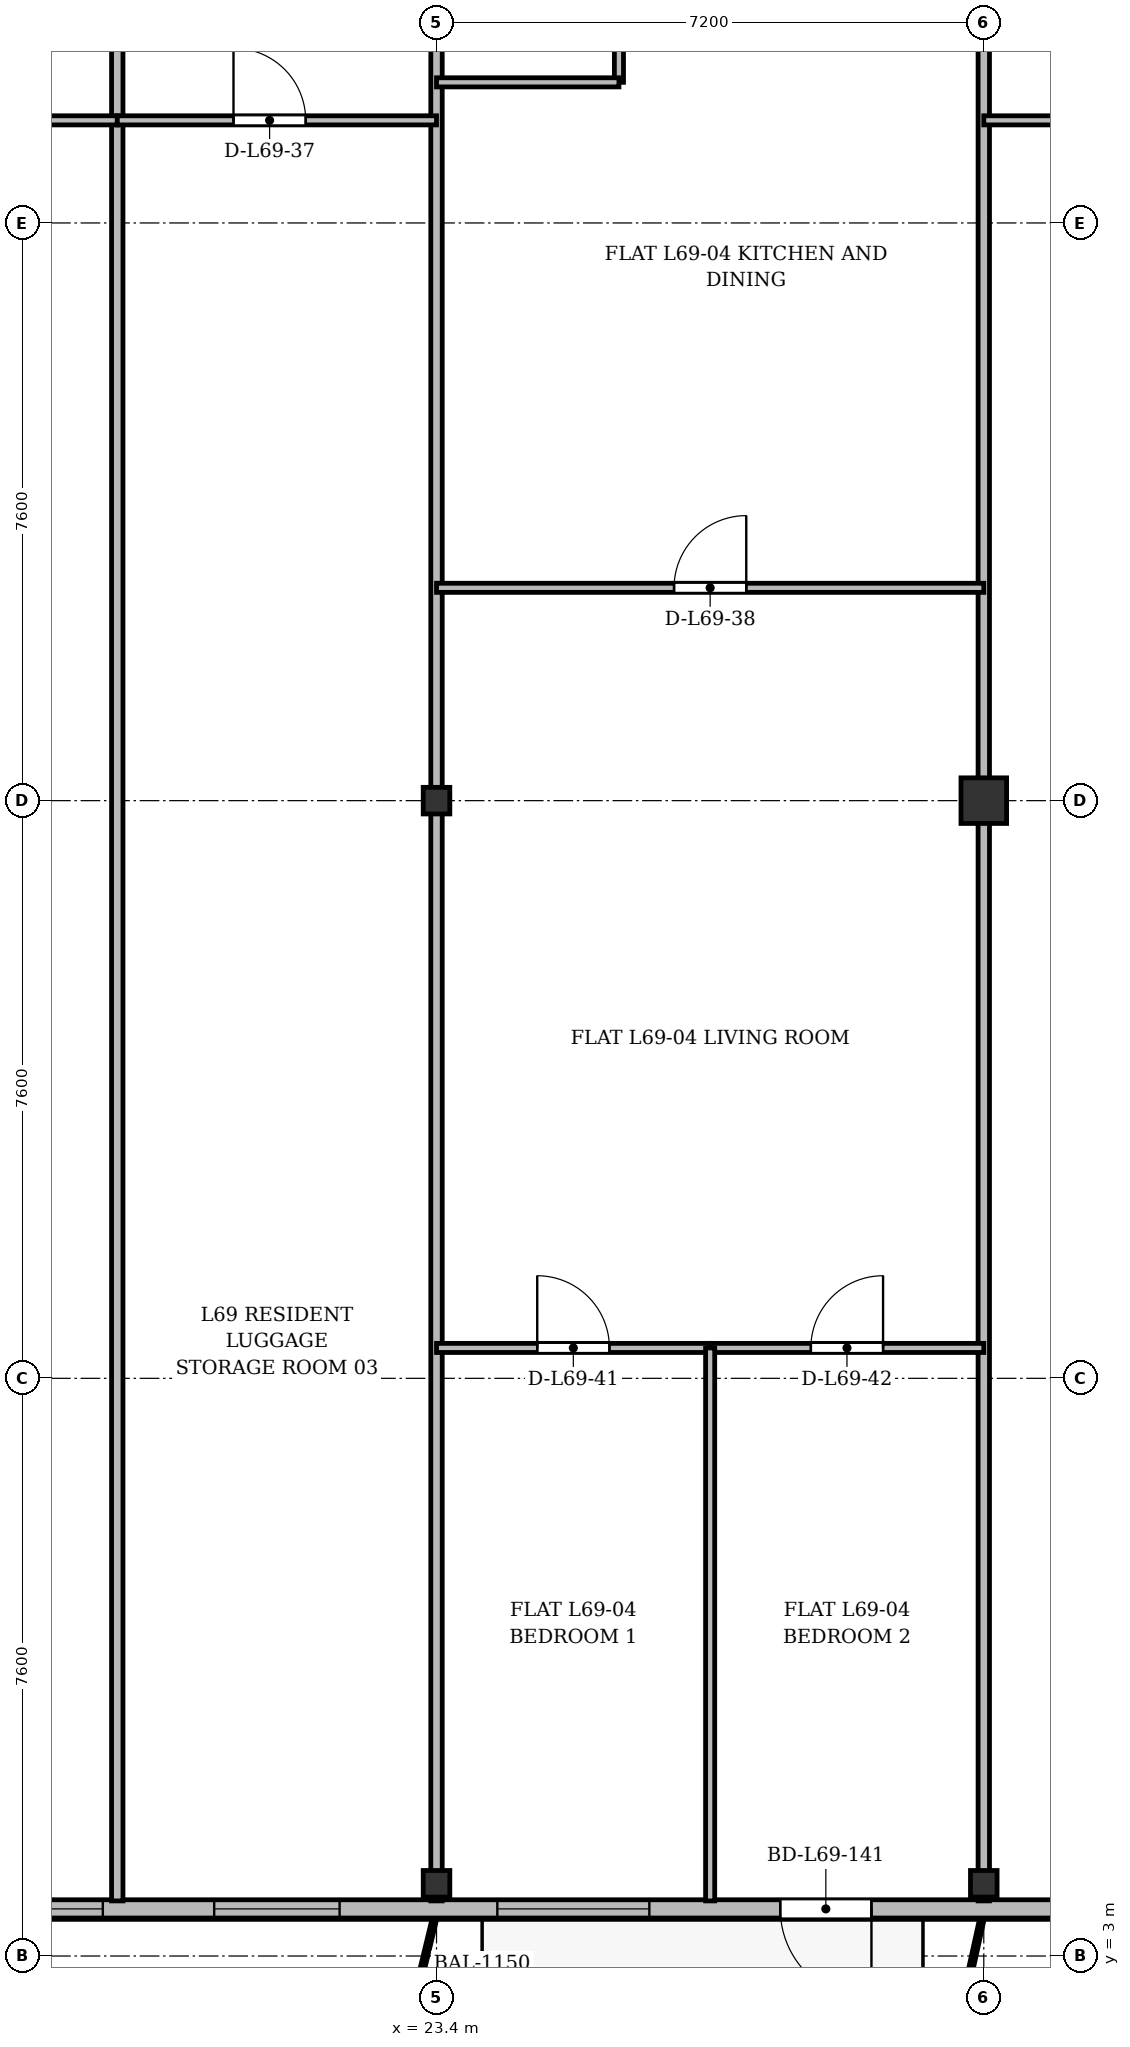
"""IFC4 building model, lengths in metres.
Left out: names, types, materials, properties, quantities, classifications, styles, units other than length and angle.
Written with IfcOpenShell. Run it as: python <this file> out.ifc"""

import sys

from ifc_helpers import new_model, si_unit, direction, frame, frame_2d, origin, origin_2d, place, context, subcontext, project, spatial, rectangle, i_section, extrude, source, transform, mapped, element, fill, save


model = new_model("IFC4")
c1 = context("Model", 3, precision=1e-05, world=origin(), true_north=direction((0.0, 1.0)))
c2 = subcontext(c1, "Body", "Model", "MODEL_VIEW")
j1 = project(units=[si_unit("LENGTHUNIT", "METRE"), si_unit("PLANEANGLEUNIT", "RADIAN")], contexts=[c1])
p1 = place(None, origin())
s1 = spatial("IfcSite", under=j1, at=p1, CompositionType="ELEMENT")
p2 = place(p1, origin())
s2 = spatial("IfcBuilding", under=s1, at=p2, CompositionType="ELEMENT")
p3 = place(p2, frame((0.0, 0.0, 266.7)))
s3 = spatial("IfcBuildingStorey", under=s2, at=p3, CompositionType="ELEMENT", Elevation=266.7)
m1 = source(origin(), c2, "Body", "SweptSolid", [
    extrude(i_section(OverallWidth=0.35, OverallDepth=0.35, WebThickness=0.018, FlangeThickness=0.028, at=origin_2d()), origin(), (0.0, 0.0, 1.0), 3.6),
])
for number, where, z_axis, x_axis in (
    (1, (23.4, 3.95, 0.0), (0.0, 0.0, 1.0), (1.0, 0.0, 0.0)),
    (2, (23.4, 18.2, 0.0), (0.0, 0.0, 1.0), (1.0, 0.0, 0.0)),
    (3, (30.6, 3.95, 0.0), (0.0, 0.0, 1.0), (1.0, 0.0, 0.0)),
):
    element("IfcColumn", number, at=place(p3, frame(where, z_axis=z_axis, x_axis=x_axis)), inside=s3, PredefinedType="COLUMN", context=c2, shape_type="MappedRepresentation", body=[
        mapped(m1, transform((0.0, 0.0, 0.0), x_axis=(1.0, 0.0, 0.0), y_axis=(0.0, 1.0, 0.0), z_axis=(0.0, 0.0, 1.0), scale=1.0)),
    ])
m2 = source(origin(), c2, "Body", "SweptSolid", [
    extrude(rectangle(XDim=0.6, YDim=0.6, at=origin_2d()), origin(), (0.0, 0.0, 1.0), 3.6),
])
p4 = place(p3, frame((30.6, 18.2, 0.0), z_axis=(0.0, 0.0, 1.0), x_axis=(1.0, 0.0, 0.0)))
e4 = element("IfcColumn", 4, at=p4, inside=s3, PredefinedType="COLUMN", context=c2, shape_type="MappedRepresentation", body=[
    mapped(m2, transform((0.0, 0.0, 0.0), x_axis=(1.0, 0.0, 0.0), y_axis=(0.0, 1.0, 0.0), z_axis=(0.0, 0.0, 1.0), scale=1.0)),
])
p5 = place(p3, frame((63.2, 3.62, 0.0), z_axis=(0.0, 0.0, 1.0), x_axis=(-1.0, 0.0, 0.0)))
e5 = element("IfcWall", 5, at=p5, inside=s3, PredefinedType="SOLIDWALL", context=c2, shape_type="SweptSolid", body=[
    extrude(rectangle(XDim=52.0, YDim=0.24, at=frame_2d((26.0, 0.0))), origin(), (0.0, 0.0, 1.0), 3.37),
])
p6 = place(p5, frame((0.345, 0.0, 0.9)))
e6 = element("IfcOpeningElement", 6, at=p6, cuts=e5, PredefinedType="OPENING", context=c2, shape_type="SweptSolid", body=[
    extrude(rectangle(XDim=1.2, YDim=1.65, at=frame_2d((0.6, 0.825))), frame((0.0, 0.13, 0.0), z_axis=(0.0, -1.0, 0.0), x_axis=(1.0, 0.0, 0.0)), (0.0, 0.0, 1.0), 0.26),
])
p7 = place(p5, frame((2.15, 0.0, 0.9)))
e7 = element("IfcOpeningElement", 7, at=p7, cuts=e5, PredefinedType="OPENING", context=c2, shape_type="SweptSolid", body=[
    extrude(rectangle(XDim=1.8, YDim=1.8, at=frame_2d((0.9, 0.9))), frame((0.0, 0.13, 0.0), z_axis=(0.0, -1.0, 0.0), x_axis=(1.0, 0.0, 0.0)), (0.0, 0.0, 1.0), 0.26),
])
p8 = place(p5, frame((5.42, 0.0, 0.0)))
e8 = element("IfcOpeningElement", 8, at=p8, cuts=e5, PredefinedType="OPENING", context=c2, shape_type="SweptSolid", body=[
    extrude(rectangle(XDim=1.2, YDim=2.2, at=frame_2d((0.6, 1.1))), frame((0.0, 0.13, 0.0), z_axis=(0.0, -1.0, 0.0), x_axis=(1.0, 0.0, 0.0)), (0.0, 0.0, 1.0), 0.26),
])
p9 = place(p5, frame((8.75, 0.0, 0.9)))
e9 = element("IfcOpeningElement", 9, at=p9, cuts=e5, PredefinedType="OPENING", context=c2, shape_type="SweptSolid", body=[
    extrude(rectangle(XDim=1.5, YDim=1.75, at=frame_2d((0.75, 0.875))), frame((0.0, 0.13, 0.0), z_axis=(0.0, -1.0, 0.0), x_axis=(1.0, 0.0, 0.0)), (0.0, 0.0, 1.0), 0.26),
])
p10 = place(p5, frame((14.8, 0.0, 0.9)))
e10 = element("IfcOpeningElement", 10, at=p10, cuts=e5, PredefinedType="OPENING", context=c2, shape_type="SweptSolid", body=[
    extrude(rectangle(XDim=2.0, YDim=1.95, at=frame_2d((1.0, 0.975))), frame((0.0, 0.13, 0.0), z_axis=(0.0, -1.0, 0.0), x_axis=(1.0, 0.0, 0.0)), (0.0, 0.0, 1.0), 0.26),
])
p11 = place(p5, frame((20.425, 0.0, 0.9)))
e11 = element("IfcOpeningElement", 11, at=p11, cuts=e5, PredefinedType="OPENING", context=c2, shape_type="SweptSolid", body=[
    extrude(rectangle(XDim=1.65, YDim=1.85, at=frame_2d((0.825, 0.925))), frame((0.0, 0.13, 0.0), z_axis=(0.0, -1.0, 0.0), x_axis=(1.0, 0.0, 0.0)), (0.0, 0.0, 1.0), 0.26),
])
p12 = place(p5, frame((24.05, 0.0, 0.9)))
e12 = element("IfcOpeningElement", 12, at=p12, cuts=e5, PredefinedType="OPENING", context=c2, shape_type="SweptSolid", body=[
    extrude(rectangle(XDim=1.8, YDim=1.8, at=frame_2d((0.9, 0.9))), frame((0.0, 0.13, 0.0), z_axis=(0.0, -1.0, 0.0), x_axis=(1.0, 0.0, 0.0)), (0.0, 0.0, 1.0), 0.26),
])
p13 = place(p5, frame((28.6, 0.0, 0.9)))
e13 = element("IfcOpeningElement", 13, at=p13, cuts=e5, PredefinedType="OPENING", context=c2, shape_type="SweptSolid", body=[
    extrude(rectangle(XDim=2.2, YDim=1.8, at=frame_2d((1.1, 0.9))), frame((0.0, 0.13, 0.0), z_axis=(0.0, -1.0, 0.0), x_axis=(1.0, 0.0, 0.0)), (0.0, 0.0, 1.0), 0.26),
])
p14 = place(p5, frame((34.078, 0.0, 0.0)))
e14 = element("IfcOpeningElement", 14, at=p14, cuts=e5, PredefinedType="OPENING", context=c2, shape_type="SweptSolid", body=[
    extrude(rectangle(XDim=1.2, YDim=2.2, at=frame_2d((0.6, 1.1))), frame((0.0, 0.13, 0.0), z_axis=(0.0, -1.0, 0.0), x_axis=(1.0, 0.0, 0.0)), (0.0, 0.0, 1.0), 0.26),
])
p15 = place(p5, frame((37.0, 0.0, 0.9)))
e15 = element("IfcOpeningElement", 15, at=p15, cuts=e5, PredefinedType="OPENING", context=c2, shape_type="SweptSolid", body=[
    extrude(rectangle(XDim=2.0, YDim=1.95, at=frame_2d((1.0, 0.975))), frame((0.0, 0.13, 0.0), z_axis=(0.0, -1.0, 0.0), x_axis=(1.0, 0.0, 0.0)), (0.0, 0.0, 1.0), 0.26),
])
p16 = place(p5, frame((41.075, 0.0, 0.9)))
e16 = element("IfcOpeningElement", 16, at=p16, cuts=e5, PredefinedType="OPENING", context=c2, shape_type="SweptSolid", body=[
    extrude(rectangle(XDim=1.65, YDim=1.85, at=frame_2d((0.825, 0.925))), frame((0.0, 0.13, 0.0), z_axis=(0.0, -1.0, 0.0), x_axis=(1.0, 0.0, 0.0)), (0.0, 0.0, 1.0), 0.26),
])
p17 = place(p5, frame((44.19, 0.0, 0.9)))
e17 = element("IfcOpeningElement", 17, at=p17, cuts=e5, PredefinedType="OPENING", context=c2, shape_type="SweptSolid", body=[
    extrude(rectangle(XDim=1.8, YDim=1.8, at=frame_2d((0.9, 0.9))), frame((0.0, 0.13, 0.0), z_axis=(0.0, -1.0, 0.0), x_axis=(1.0, 0.0, 0.0)), (0.0, 0.0, 1.0), 0.26),
])
p18 = place(p5, frame((50.005, 0.0, 0.9)))
e18 = element("IfcOpeningElement", 18, at=p18, cuts=e5, PredefinedType="OPENING", context=c2, shape_type="SweptSolid", body=[
    extrude(rectangle(XDim=1.5, YDim=1.75, at=frame_2d((0.75, 0.875))), frame((0.0, 0.13, 0.0), z_axis=(0.0, -1.0, 0.0), x_axis=(1.0, 0.0, 0.0)), (0.0, 0.0, 1.0), 0.26),
])
p19 = place(p3, frame((19.2, 3.725, 0.0), z_axis=(0.0, 0.0, 1.0), x_axis=(0.0, 1.0, 0.0)))
e19 = element("IfcWall", 19, at=p19, inside=s3, PredefinedType="PARTITIONING", context=c2, shape_type="SweptSolid", body=[
    extrude(rectangle(XDim=27.275, YDim=0.15, at=frame_2d((13.637, 0.0))), origin(), (0.0, 0.0, 1.0), 2.92),
])
for number, where, z_axis, x_axis in (
    (20, (23.4, 3.725, 0.0), (0.0, 0.0, 1.0), (0.0, 1.0, 0.0)),
    (21, (30.6, 3.725, 0.0), (0.0, 0.0, 1.0), (0.0, 1.0, 0.0)),
):
    element("IfcWall", number, at=place(p3, frame(where, z_axis=z_axis, x_axis=x_axis)), inside=s3, PredefinedType="PARTITIONING", context=c2, shape_type="SweptSolid", body=[
        extrude(rectangle(XDim=27.275, YDim=0.15, at=frame_2d((13.637, 0.0))), origin(), (0.0, 0.0, 1.0), 2.87),
    ])
p20 = place(p3, frame((13.6, 27.15, 0.0), z_axis=(0.0, 0.0, 1.0), x_axis=(1.0, 0.0, 0.0)))
e22 = element("IfcWall", 22, at=p20, inside=s3, PredefinedType="PARTITIONING", context=c2, shape_type="SweptSolid", body=[
    extrude(rectangle(XDim=5.6, YDim=0.12, at=frame_2d((2.8, 0.0))), origin(), (0.0, 0.0, 1.0), 2.87),
])
p21 = place(p20, frame((2.232, 0.0, 0.0)))
e23 = element("IfcOpeningElement", 23, at=p21, cuts=e22, PredefinedType="OPENING", context=c2, shape_type="SweptSolid", body=[
    extrude(rectangle(XDim=0.95, YDim=2.15, at=frame_2d((0.475, 1.075))), frame((0.0, 0.07, 0.0), z_axis=(0.0, -1.0, 0.0), x_axis=(1.0, 0.0, 0.0)), (0.0, 0.0, 1.0), 0.14),
])
p22 = place(p3, frame((19.2, 27.15, 0.0), z_axis=(0.0, 0.0, 1.0), x_axis=(1.0, 0.0, 0.0)))
e24 = element("IfcWall", 24, at=p22, inside=s3, PredefinedType="PARTITIONING", context=c2, shape_type="SweptSolid", body=[
    extrude(rectangle(XDim=4.2, YDim=0.12, at=frame_2d((2.1, 0.0))), origin(), (0.0, 0.0, 1.0), 2.87),
])
p23 = place(p22, frame((1.529, 0.0, 0.0)))
e25 = element("IfcOpeningElement", 25, at=p23, cuts=e24, PredefinedType="OPENING", context=c2, shape_type="SweptSolid", body=[
    extrude(rectangle(XDim=0.95, YDim=2.15, at=frame_2d((0.475, 1.075))), frame((0.0, 0.07, 0.0), z_axis=(0.0, -1.0, 0.0), x_axis=(1.0, 0.0, 0.0)), (0.0, 0.0, 1.0), 0.14),
])
p24 = place(p3, frame((23.4, 21.0, 0.0), z_axis=(0.0, 0.0, 1.0), x_axis=(1.0, 0.0, 0.0)))
e26 = element("IfcWall", 26, at=p24, inside=s3, PredefinedType="PARTITIONING", context=c2, shape_type="SweptSolid", body=[
    extrude(rectangle(XDim=7.2, YDim=0.12, at=frame_2d((3.6, 0.0))), origin(), (0.0, 0.0, 1.0), 2.87),
])
p25 = place(p24, frame((3.125, 0.0, 0.0)))
e27 = element("IfcOpeningElement", 27, at=p25, cuts=e26, PredefinedType="OPENING", context=c2, shape_type="SweptSolid", body=[
    extrude(rectangle(XDim=0.95, YDim=2.15, at=frame_2d((0.475, 1.075))), frame((0.0, 0.07, 0.0), z_axis=(0.0, -1.0, 0.0), x_axis=(1.0, 0.0, 0.0)), (0.0, 0.0, 1.0), 0.14),
])
p26 = place(p3, frame((25.8, 27.65, 0.0), z_axis=(0.0, 0.0, 1.0), x_axis=(0.0, 1.0, 0.0)))
e28 = element("IfcWall", 28, at=p26, inside=s3, PredefinedType="PARTITIONING", context=c2, shape_type="SweptSolid", body=[
    extrude(rectangle(XDim=3.35, YDim=0.12, at=frame_2d((1.675, 0.0))), origin(), (0.0, 0.0, 1.0), 3.37),
])
p27 = place(p26, frame((0.8, 0.0, 0.0)))
e29 = element("IfcOpeningElement", 29, at=p27, cuts=e28, PredefinedType="OPENING", context=c2, shape_type="SweptSolid", body=[
    extrude(rectangle(XDim=0.85, YDim=2.1, at=frame_2d((0.425, 1.05))), frame((0.0, 0.07, 0.0), z_axis=(0.0, -1.0, 0.0), x_axis=(1.0, 0.0, 0.0)), (0.0, 0.0, 1.0), 0.14),
])
p28 = place(p3, frame((23.4, 27.65, 0.0), z_axis=(0.0, 0.0, 1.0), x_axis=(1.0, 0.0, 0.0)))
e30 = element("IfcWall", 30, at=p28, inside=s3, PredefinedType="PARTITIONING", context=c2, shape_type="SweptSolid", body=[
    extrude(rectangle(XDim=2.4, YDim=0.12, at=frame_2d((1.2, 0.0))), origin(), (0.0, 0.0, 1.0), 2.87),
])
p29 = place(p3, frame((23.4, 11.0, 0.0), z_axis=(0.0, 0.0, 1.0), x_axis=(1.0, 0.0, 0.0)))
e31 = element("IfcWall", 31, at=p29, inside=s3, PredefinedType="PARTITIONING", context=c2, shape_type="SweptSolid", body=[
    extrude(rectangle(XDim=3.6, YDim=0.12, at=frame_2d((1.8, 0.0))), origin(), (0.0, 0.0, 1.0), 2.87),
])
p30 = place(p29, frame((1.325, 0.0, 0.0)))
e32 = element("IfcOpeningElement", 32, at=p30, cuts=e31, PredefinedType="OPENING", context=c2, shape_type="SweptSolid", body=[
    extrude(rectangle(XDim=0.95, YDim=2.15, at=frame_2d((0.475, 1.075))), frame((0.0, 0.07, 0.0), z_axis=(0.0, -1.0, 0.0), x_axis=(1.0, 0.0, 0.0)), (0.0, 0.0, 1.0), 0.14),
])
p31 = place(p3, frame((27.0, 11.0, 0.0), z_axis=(0.0, 0.0, 1.0), x_axis=(1.0, 0.0, 0.0)))
e33 = element("IfcWall", 33, at=p31, inside=s3, PredefinedType="PARTITIONING", context=c2, shape_type="SweptSolid", body=[
    extrude(rectangle(XDim=3.6, YDim=0.12, at=frame_2d((1.8, 0.0))), origin(), (0.0, 0.0, 1.0), 2.87),
])
p32 = place(p31, frame((1.325, 0.0, 0.0)))
e34 = element("IfcOpeningElement", 34, at=p32, cuts=e33, PredefinedType="OPENING", context=c2, shape_type="SweptSolid", body=[
    extrude(rectangle(XDim=0.95, YDim=2.15, at=frame_2d((0.475, 1.075))), frame((0.0, 0.07, 0.0), z_axis=(0.0, -1.0, 0.0), x_axis=(1.0, 0.0, 0.0)), (0.0, 0.0, 1.0), 0.14),
])
p33 = place(p3, frame((27.0, 3.725, 0.0), z_axis=(0.0, 0.0, 1.0), x_axis=(0.0, 1.0, 0.0)))
e35 = element("IfcWall", 35, at=p33, inside=s3, PredefinedType="PARTITIONING", context=c2, shape_type="SweptSolid", body=[
    extrude(rectangle(XDim=7.275, YDim=0.12, at=frame_2d((3.637, 0.0))), origin(), (0.0, 0.0, 1.0), 2.92),
])
p34 = place(p3, frame((30.6, 27.15, 0.0), z_axis=(0.0, 0.0, 1.0), x_axis=(1.0, 0.0, 0.0)))
e36 = element("IfcWall", 36, at=p34, inside=s3, PredefinedType="PARTITIONING", context=c2, shape_type="SweptSolid", body=[
    extrude(rectangle(XDim=5.8, YDim=0.12, at=frame_2d((2.9, 0.0))), origin(), (0.0, 0.0, 1.0), 2.87),
])
p35 = place(p34, frame((2.425, 0.0, 0.0)))
e37 = element("IfcOpeningElement", 37, at=p35, cuts=e36, PredefinedType="OPENING", context=c2, shape_type="SweptSolid", body=[
    extrude(rectangle(XDim=0.95, YDim=2.15, at=frame_2d((0.475, 1.075))), frame((0.0, 0.07, 0.0), z_axis=(0.0, -1.0, 0.0), x_axis=(1.0, 0.0, 0.0)), (0.0, 0.0, 1.0), 0.14),
])
m3 = source(origin(), c2, "Body", "SweptSolid", [
    extrude(rectangle(XDim=1.2, YDim=2.2, at=frame_2d((0.6, 1.1))), frame((0.0, 0.025, 0.0), z_axis=(0.0, -1.0, 0.0), x_axis=(1.0, 0.0, 0.0)), (0.0, 0.0, 1.0), 0.05),
])
p36 = place(p14, origin())
e38 = element("IfcDoor", 38, at=p36, inside=s3, OperationType="SINGLE_SWING_LEFT", PredefinedType="DOOR", context=c2, shape_type="MappedRepresentation", body=[
    mapped(m3, transform((0.0, 0.0, 0.0), x_axis=(1.0, 0.0, 0.0), y_axis=(0.0, 1.0, 0.0), z_axis=(0.0, 0.0, 1.0), scale=1.0)),
])
fill(e14, e38)
m4 = source(origin(), c2, "Body", "SweptSolid", [
    extrude(rectangle(XDim=2.0, YDim=1.95, at=frame_2d((1.0, 0.975))), frame((0.0, 0.03, 0.0), z_axis=(0.0, -1.0, 0.0), x_axis=(1.0, 0.0, 0.0)), (0.0, 0.0, 1.0), 0.06),
])
p37 = place(p15, origin())
e39 = element("IfcWindow", 39, at=p37, inside=s3, PartitioningType="SINGLE_PANEL", PredefinedType="WINDOW", context=c2, shape_type="MappedRepresentation", body=[
    mapped(m4, transform((0.0, 0.0, 0.0), x_axis=(1.0, 0.0, 0.0), y_axis=(0.0, 1.0, 0.0), z_axis=(0.0, 0.0, 1.0), scale=1.0)),
])
fill(e15, e39)
m5 = source(origin(), c2, "Body", "SweptSolid", [
    extrude(rectangle(XDim=1.65, YDim=1.85, at=frame_2d((0.825, 0.925))), frame((0.0, 0.03, 0.0), z_axis=(0.0, -1.0, 0.0), x_axis=(1.0, 0.0, 0.0)), (0.0, 0.0, 1.0), 0.06),
])
p38 = place(p16, origin())
e40 = element("IfcWindow", 40, at=p38, inside=s3, PartitioningType="SINGLE_PANEL", PredefinedType="WINDOW", context=c2, shape_type="MappedRepresentation", body=[
    mapped(m5, transform((0.0, 0.0, 0.0), x_axis=(1.0, 0.0, 0.0), y_axis=(0.0, 1.0, 0.0), z_axis=(0.0, 0.0, 1.0), scale=1.0)),
])
fill(e16, e40)
m6 = source(origin(), c2, "Body", "SweptSolid", [
    extrude(rectangle(XDim=1.8, YDim=1.8, at=frame_2d((0.9, 0.9))), frame((0.0, 0.03, 0.0), z_axis=(0.0, -1.0, 0.0), x_axis=(1.0, 0.0, 0.0)), (0.0, 0.0, 1.0), 0.06),
])
p39 = place(p17, origin())
e41 = element("IfcWindow", 41, at=p39, inside=s3, PartitioningType="SINGLE_PANEL", PredefinedType="WINDOW", context=c2, shape_type="MappedRepresentation", body=[
    mapped(m6, transform((0.0, 0.0, 0.0), x_axis=(1.0, 0.0, 0.0), y_axis=(0.0, 1.0, 0.0), z_axis=(0.0, 0.0, 1.0), scale=1.0)),
])
fill(e17, e41)
m7 = source(origin(), c2, "Body", "SweptSolid", [
    extrude(rectangle(XDim=0.95, YDim=2.15, at=frame_2d((0.475, 1.075))), frame((0.0, 0.025, 0.0), z_axis=(0.0, -1.0, 0.0), x_axis=(1.0, 0.0, 0.0)), (0.0, 0.0, 1.0), 0.05),
])
p40 = place(p23, origin())
e42 = element("IfcDoor", 42, at=p40, inside=s3, OperationType="SINGLE_SWING_LEFT", PredefinedType="DOOR", context=c2, shape_type="MappedRepresentation", body=[
    mapped(m7, transform((0.0, 0.0, 0.0), x_axis=(1.0, 0.0, 0.0), y_axis=(0.0, 1.0, 0.0), z_axis=(0.0, 0.0, 1.0), scale=1.0)),
])
fill(e25, e42)
p41 = place(p25, origin())
e43 = element("IfcDoor", 43, at=p41, inside=s3, OperationType="SINGLE_SWING_RIGHT", PredefinedType="DOOR", context=c2, shape_type="MappedRepresentation", body=[
    mapped(m7, transform((0.0, 0.0, 0.0), x_axis=(1.0, 0.0, 0.0), y_axis=(0.0, 1.0, 0.0), z_axis=(0.0, 0.0, 1.0), scale=1.0)),
])
fill(e27, e43)
p42 = place(p30, origin())
e44 = element("IfcDoor", 44, at=p42, inside=s3, OperationType="SINGLE_SWING_LEFT", PredefinedType="DOOR", context=c2, shape_type="MappedRepresentation", body=[
    mapped(m7, transform((0.0, 0.0, 0.0), x_axis=(1.0, 0.0, 0.0), y_axis=(0.0, 1.0, 0.0), z_axis=(0.0, 0.0, 1.0), scale=1.0)),
])
fill(e32, e44)
p43 = place(p32, origin())
e45 = element("IfcDoor", 45, at=p43, inside=s3, OperationType="SINGLE_SWING_RIGHT", PredefinedType="DOOR", context=c2, shape_type="MappedRepresentation", body=[
    mapped(m7, transform((0.0, 0.0, 0.0), x_axis=(1.0, 0.0, 0.0), y_axis=(0.0, 1.0, 0.0), z_axis=(0.0, 0.0, 1.0), scale=1.0)),
])
fill(e34, e45)
save(model, sys.argv[1])
